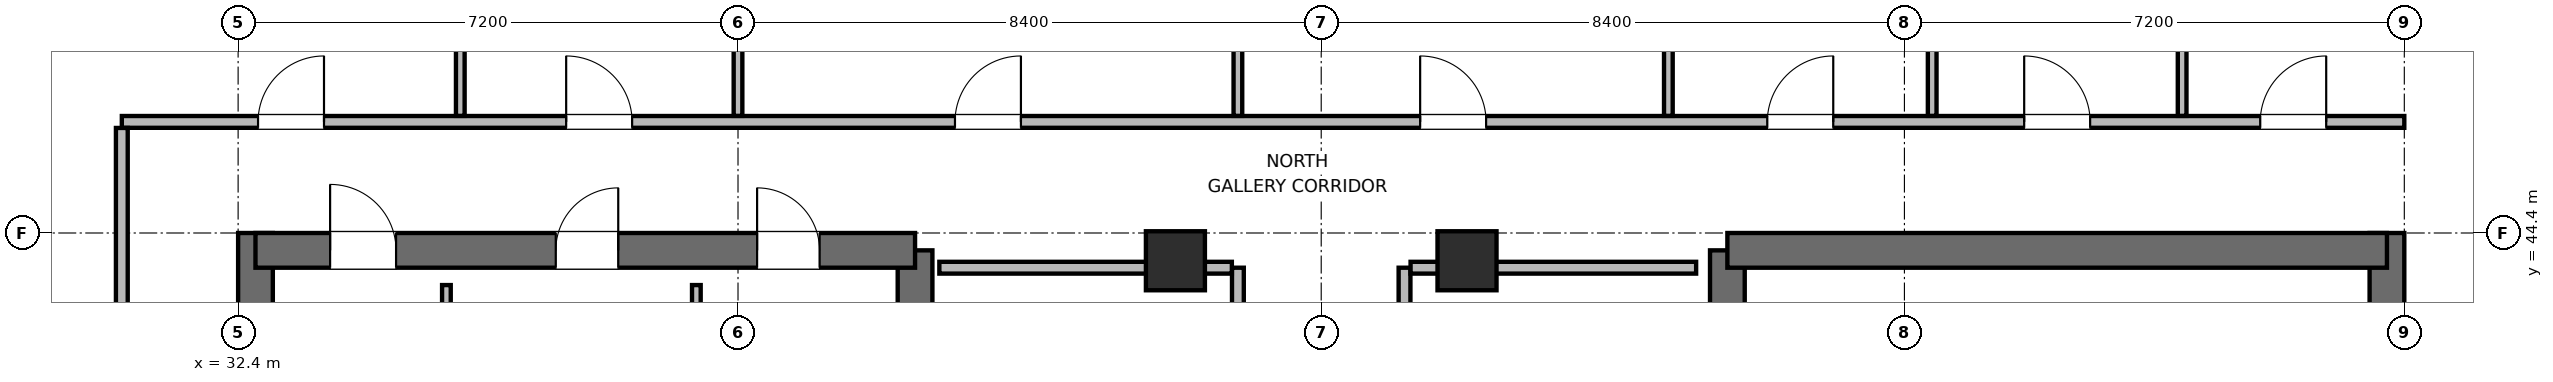
"""IFC4 building model, lengths in metres.
Left out: names, types, materials, properties, quantities, classifications, styles, units other than length and angle.
Written with IfcOpenShell. Run it as: python <this file> out.ifc"""

import sys

from ifc_helpers import new_model, si_unit, direction, frame, frame_2d, origin, origin_2d, place, context, subcontext, project, spatial, rectangle, extrude, element, fill, save


model = new_model("IFC4")
c1 = context("Model", 3, precision=1e-05, world=origin(), true_north=direction((0.0, 1.0)))
c2 = subcontext(c1, "Body", "Model", "MODEL_VIEW")
j1 = project(units=[si_unit("LENGTHUNIT", "METRE"), si_unit("PLANEANGLEUNIT", "RADIAN")], contexts=[c1])
p1 = place(None, origin())
s1 = spatial("IfcSite", under=j1, at=p1, CompositionType="ELEMENT")
p2 = place(p1, origin())
s2 = spatial("IfcBuilding", under=s1, at=p2, CompositionType="ELEMENT")
p3 = place(p2, frame((0.0, 0.0, 302.4)))
s3 = spatial("IfcBuildingStorey", under=s2, at=p3, CompositionType="ELEMENT", Elevation=302.4)
p4 = place(p3, frame((32.65, 27.6, 0.0), z_axis=(0.0, 0.0, 1.0), x_axis=(0.0, 1.0, 0.0)))
e1 = element("IfcWall", 1, at=p4, inside=s3, PredefinedType="SHEAR", context=c2, shape_type="SweptSolid", body=[
    extrude(rectangle(XDim=16.8, YDim=0.5, at=frame_2d((8.4, 0.0))), origin(), (0.0, 0.0, 1.0), 3.9),
])
p5 = place(p3, frame((42.15, 37.8, 0.0), z_axis=(0.0, 0.0, 1.0), x_axis=(0.0, 1.0, 0.0)))
e2 = element("IfcWall", 2, at=p5, inside=s3, PredefinedType="SHEAR", context=c2, shape_type="SweptSolid", body=[
    extrude(rectangle(XDim=6.35, YDim=0.5, at=frame_2d((3.175, 0.0))), origin(), (0.0, 0.0, 1.0), 3.9),
])
p6 = place(p3, frame((32.65, 44.15, 0.0), z_axis=(0.0, 0.0, 1.0), x_axis=(1.0, 0.0, 0.0)))
e3 = element("IfcWall", 3, at=p6, inside=s3, PredefinedType="SHEAR", context=c2, shape_type="SweptSolid", body=[
    extrude(rectangle(XDim=9.5, YDim=0.5, at=frame_2d((4.75, 0.0))), origin(), (0.0, 0.0, 1.0), 3.9),
])
p7 = place(p6, frame((1.075, 0.0, 0.0)))
e4 = element("IfcOpeningElement", 4, at=p7, cuts=e3, PredefinedType="OPENING", context=c2, shape_type="SweptSolid", body=[
    extrude(rectangle(XDim=0.95, YDim=2.04, at=frame_2d((0.475, 1.02))), frame((0.0, 0.26, 0.0), z_axis=(0.0, -1.0, 0.0), x_axis=(1.0, 0.0, 0.0)), (0.0, 0.0, 1.0), 0.52),
])
p8 = place(p6, frame((4.325, 0.0, 0.0)))
e5 = element("IfcOpeningElement", 5, at=p8, cuts=e3, PredefinedType="OPENING", context=c2, shape_type="SweptSolid", body=[
    extrude(rectangle(XDim=0.9, YDim=2.02, at=frame_2d((0.45, 1.01))), frame((0.0, 0.26, 0.0), z_axis=(0.0, -1.0, 0.0), x_axis=(1.0, 0.0, 0.0)), (0.0, 0.0, 1.0), 0.52),
])
p9 = place(p6, frame((7.225, 0.0, 0.0)))
e6 = element("IfcOpeningElement", 6, at=p9, cuts=e3, PredefinedType="OPENING", context=c2, shape_type="SweptSolid", body=[
    extrude(rectangle(XDim=0.9, YDim=2.02, at=frame_2d((0.45, 1.01))), frame((0.0, 0.26, 0.0), z_axis=(0.0, -1.0, 0.0), x_axis=(1.0, 0.0, 0.0)), (0.0, 0.0, 1.0), 0.52),
])
p10 = place(p3, frame((53.85, 38.0, 0.0), z_axis=(0.0, 0.0, 1.0), x_axis=(0.0, 1.0, 0.0)))
e7 = element("IfcWall", 7, at=p10, inside=s3, PredefinedType="SHEAR", context=c2, shape_type="SweptSolid", body=[
    extrude(rectangle(XDim=6.15, YDim=0.5, at=frame_2d((3.075, 0.0))), origin(), (0.0, 0.0, 1.0), 3.9),
])
p11 = place(p3, frame((63.35, 27.6, 0.0), z_axis=(0.0, 0.0, 1.0), x_axis=(0.0, 1.0, 0.0)))
e8 = element("IfcWall", 8, at=p11, inside=s3, PredefinedType="SHEAR", context=c2, shape_type="SweptSolid", body=[
    extrude(rectangle(XDim=16.8, YDim=0.5, at=frame_2d((8.4, 0.0))), origin(), (0.0, 0.0, 1.0), 3.9),
])
p12 = place(p3, frame((53.85, 44.15, 0.0), z_axis=(0.0, 0.0, 1.0), x_axis=(1.0, 0.0, 0.0)))
e9 = element("IfcWall", 9, at=p12, inside=s3, PredefinedType="SHEAR", context=c2, shape_type="SweptSolid", body=[
    extrude(rectangle(XDim=9.5, YDim=0.5, at=frame_2d((4.75, 0.0))), origin(), (0.0, 0.0, 1.0), 3.9),
])
for number, where, z_axis, x_axis in (
    (10, (45.9, 44.0, 0.0), (0.0, 0.0, 1.0), (1.0, 0.0, 0.0)),
    (11, (50.1, 44.0, 0.0), (0.0, 0.0, 1.0), (1.0, 0.0, 0.0)),
):
    element("IfcColumn", number, at=place(p3, frame(where, z_axis=z_axis, x_axis=x_axis)), inside=s3, PredefinedType="COLUMN", context=c2, shape_type="SweptSolid", body=[
        extrude(rectangle(XDim=0.85, YDim=0.85, at=origin_2d()), origin(), (0.0, 0.0, 1.0), 3.9),
    ])
for number, where, z_axis, x_axis in (
    (12, (35.4, 41.095, 0.0), (0.0, 0.0, 1.0), (0.0, 1.0, 0.0)),
    (13, (39.0, 41.095, 0.0), (0.0, 0.0, 1.0), (0.0, 1.0, 0.0)),
):
    element("IfcWall", number, at=place(p3, frame(where, z_axis=z_axis, x_axis=x_axis)), inside=s3, PredefinedType="PARTITIONING", context=c2, shape_type="SweptSolid", body=[
        extrude(rectangle(XDim=2.555, YDim=0.125, at=frame_2d((1.277, 0.0))), origin(), (0.0, 0.0, 1.0), 3.68),
    ])
p13 = place(p3, frame((46.8, 37.9, 0.0), z_axis=(0.0, 0.0, 1.0), x_axis=(0.0, 1.0, 0.0)))
e14 = element("IfcWall", 14, at=p13, inside=s3, PredefinedType="PARTITIONING", context=c2, shape_type="SweptSolid", body=[
    extrude(rectangle(XDim=6.0, YDim=0.17, at=frame_2d((3.0, 0.0))), origin(), (0.0, 0.0, 1.0), 3.68),
])
p14 = place(p13, frame((0.69, 0.0, 0.0)))
e15 = element("IfcOpeningElement", 15, at=p14, cuts=e14, PredefinedType="OPENING", context=c2, shape_type="SweptSolid", body=[
    extrude(rectangle(XDim=0.9, YDim=2.02, at=frame_2d((0.45, 1.01))), frame((0.0, 0.095, 0.0), z_axis=(0.0, -1.0, 0.0), x_axis=(1.0, 0.0, 0.0)), (0.0, 0.0, 1.0), 0.19),
])
p15 = place(p13, frame((3.69, 0.0, 0.0)))
e16 = element("IfcOpeningElement", 16, at=p15, cuts=e14, PredefinedType="OPENING", context=c2, shape_type="SweptSolid", body=[
    extrude(rectangle(XDim=0.9, YDim=2.02, at=frame_2d((0.45, 1.01))), frame((0.0, 0.095, 0.0), z_axis=(0.0, -1.0, 0.0), x_axis=(1.0, 0.0, 0.0)), (0.0, 0.0, 1.0), 0.19),
])
p16 = place(p3, frame((42.5, 43.9, 0.0), z_axis=(0.0, 0.0, 1.0), x_axis=(1.0, 0.0, 0.0)))
e17 = element("IfcWall", 17, at=p16, inside=s3, PredefinedType="PARTITIONING", context=c2, shape_type="SweptSolid", body=[
    extrude(rectangle(XDim=4.213, YDim=0.17, at=frame_2d((2.106, 0.0))), origin(), (0.0, 0.0, 1.0), 2.765),
])
p17 = place(p3, frame((49.2, 37.9, 0.0), z_axis=(0.0, 0.0, 1.0), x_axis=(0.0, 1.0, 0.0)))
e18 = element("IfcWall", 18, at=p17, inside=s3, PredefinedType="PARTITIONING", context=c2, shape_type="SweptSolid", body=[
    extrude(rectangle(XDim=6.0, YDim=0.17, at=frame_2d((3.0, 0.0))), origin(), (0.0, 0.0, 1.0), 3.68),
])
p18 = place(p17, frame((0.54, 0.0, 0.0)))
e19 = element("IfcOpeningElement", 19, at=p18, cuts=e18, PredefinedType="OPENING", context=c2, shape_type="SweptSolid", body=[
    extrude(rectangle(XDim=0.9, YDim=2.02, at=frame_2d((0.45, 1.01))), frame((0.0, 0.095, 0.0), z_axis=(0.0, -1.0, 0.0), x_axis=(1.0, 0.0, 0.0)), (0.0, 0.0, 1.0), 0.19),
])
p19 = place(p17, frame((2.55, 0.0, 0.0)))
e20 = element("IfcOpeningElement", 20, at=p19, cuts=e18, PredefinedType="OPENING", context=c2, shape_type="SweptSolid", body=[
    extrude(rectangle(XDim=0.9, YDim=2.02, at=frame_2d((0.45, 1.01))), frame((0.0, 0.095, 0.0), z_axis=(0.0, -1.0, 0.0), x_axis=(1.0, 0.0, 0.0)), (0.0, 0.0, 1.0), 0.19),
])
p20 = place(p17, frame((4.56, 0.0, 0.0)))
e21 = element("IfcOpeningElement", 21, at=p20, cuts=e18, PredefinedType="OPENING", context=c2, shape_type="SweptSolid", body=[
    extrude(rectangle(XDim=0.9, YDim=2.02, at=frame_2d((0.45, 1.01))), frame((0.0, 0.095, 0.0), z_axis=(0.0, -1.0, 0.0), x_axis=(1.0, 0.0, 0.0)), (0.0, 0.0, 1.0), 0.19),
])
p21 = place(p3, frame((49.287, 43.9, 0.0), z_axis=(0.0, 0.0, 1.0), x_axis=(1.0, 0.0, 0.0)))
e22 = element("IfcWall", 22, at=p21, inside=s3, PredefinedType="PARTITIONING", context=c2, shape_type="SweptSolid", body=[
    extrude(rectangle(XDim=4.113, YDim=0.17, at=frame_2d((2.056, 0.0))), origin(), (0.0, 0.0, 1.0), 2.765),
])
p22 = place(p3, frame((30.725, 46.0, 0.0), z_axis=(0.0, 0.0, 1.0), x_axis=(1.0, 0.0, 0.0)))
e23 = element("IfcWall", 23, at=p22, inside=s3, PredefinedType="PARTITIONING", context=c2, shape_type="SweptSolid", body=[
    extrude(rectangle(XDim=32.875, YDim=0.17, at=frame_2d((16.438, 0.0))), origin(), (0.0, 0.0, 1.0), 3.68),
])
p23 = place(p22, frame((1.962, 0.0, 0.0)))
e24 = element("IfcOpeningElement", 24, at=p23, cuts=e23, PredefinedType="OPENING", context=c2, shape_type="SweptSolid", body=[
    extrude(rectangle(XDim=0.95, YDim=2.04, at=frame_2d((0.475, 1.02))), frame((0.0, 0.095, 0.0), z_axis=(0.0, -1.0, 0.0), x_axis=(1.0, 0.0, 0.0)), (0.0, 0.0, 1.0), 0.19),
])
p24 = place(p22, frame((6.4, 0.0, 0.0)))
e25 = element("IfcOpeningElement", 25, at=p24, cuts=e23, PredefinedType="OPENING", context=c2, shape_type="SweptSolid", body=[
    extrude(rectangle(XDim=0.95, YDim=2.04, at=frame_2d((0.475, 1.02))), frame((0.0, 0.095, 0.0), z_axis=(0.0, -1.0, 0.0), x_axis=(1.0, 0.0, 0.0)), (0.0, 0.0, 1.0), 0.19),
])
p25 = place(p22, frame((12.0, 0.0, 0.0)))
e26 = element("IfcOpeningElement", 26, at=p25, cuts=e23, PredefinedType="OPENING", context=c2, shape_type="SweptSolid", body=[
    extrude(rectangle(XDim=0.95, YDim=2.04, at=frame_2d((0.475, 1.02))), frame((0.0, 0.095, 0.0), z_axis=(0.0, -1.0, 0.0), x_axis=(1.0, 0.0, 0.0)), (0.0, 0.0, 1.0), 0.19),
])
p26 = place(p22, frame((18.7, 0.0, 0.0)))
e27 = element("IfcOpeningElement", 27, at=p26, cuts=e23, PredefinedType="OPENING", context=c2, shape_type="SweptSolid", body=[
    extrude(rectangle(XDim=0.95, YDim=2.04, at=frame_2d((0.475, 1.02))), frame((0.0, 0.095, 0.0), z_axis=(0.0, -1.0, 0.0), x_axis=(1.0, 0.0, 0.0)), (0.0, 0.0, 1.0), 0.19),
])
p27 = place(p22, frame((23.7, 0.0, 0.0)))
e28 = element("IfcOpeningElement", 28, at=p27, cuts=e23, PredefinedType="OPENING", context=c2, shape_type="SweptSolid", body=[
    extrude(rectangle(XDim=0.95, YDim=2.04, at=frame_2d((0.475, 1.02))), frame((0.0, 0.095, 0.0), z_axis=(0.0, -1.0, 0.0), x_axis=(1.0, 0.0, 0.0)), (0.0, 0.0, 1.0), 0.19),
])
p28 = place(p22, frame((27.4, 0.0, 0.0)))
e29 = element("IfcOpeningElement", 29, at=p28, cuts=e23, PredefinedType="OPENING", context=c2, shape_type="SweptSolid", body=[
    extrude(rectangle(XDim=0.95, YDim=2.04, at=frame_2d((0.475, 1.02))), frame((0.0, 0.095, 0.0), z_axis=(0.0, -1.0, 0.0), x_axis=(1.0, 0.0, 0.0)), (0.0, 0.0, 1.0), 0.19),
])
p29 = place(p22, frame((30.8, 0.0, 0.0)))
e30 = element("IfcOpeningElement", 30, at=p29, cuts=e23, PredefinedType="OPENING", context=c2, shape_type="SweptSolid", body=[
    extrude(rectangle(XDim=0.95, YDim=2.04, at=frame_2d((0.475, 1.02))), frame((0.0, 0.095, 0.0), z_axis=(0.0, -1.0, 0.0), x_axis=(1.0, 0.0, 0.0)), (0.0, 0.0, 1.0), 0.19),
])
p30 = place(p3, frame((30.725, 26.087, 0.0), z_axis=(0.0, 0.0, 1.0), x_axis=(0.0, 1.0, 0.0)))
e31 = element("IfcWall", 31, at=p30, inside=s3, PredefinedType="PARTITIONING", context=c2, shape_type="SweptSolid", body=[
    extrude(rectangle(XDim=19.826, YDim=0.17, at=frame_2d((9.913, 0.0))), origin(), (0.0, 0.0, 1.0), 3.68),
])
p31 = place(p30, frame((3.138, 0.0, 0.0)))
e32 = element("IfcOpeningElement", 32, at=p31, cuts=e31, PredefinedType="OPENING", context=c2, shape_type="SweptSolid", body=[
    extrude(rectangle(XDim=0.95, YDim=2.04, at=frame_2d((0.475, 1.02))), frame((0.0, 0.095, 0.0), z_axis=(0.0, -1.0, 0.0), x_axis=(1.0, 0.0, 0.0)), (0.0, 0.0, 1.0), 0.19),
])
p32 = place(p30, frame((10.038, 0.0, 0.0)))
e33 = element("IfcOpeningElement", 33, at=p32, cuts=e31, PredefinedType="OPENING", context=c2, shape_type="SweptSolid", body=[
    extrude(rectangle(XDim=0.95, YDim=2.04, at=frame_2d((0.475, 1.02))), frame((0.0, 0.095, 0.0), z_axis=(0.0, -1.0, 0.0), x_axis=(1.0, 0.0, 0.0)), (0.0, 0.0, 1.0), 0.19),
])
p33 = place(p30, frame((16.338, 0.0, 0.0)))
e34 = element("IfcOpeningElement", 34, at=p33, cuts=e31, PredefinedType="OPENING", context=c2, shape_type="SweptSolid", body=[
    extrude(rectangle(XDim=0.95, YDim=2.04, at=frame_2d((0.475, 1.02))), frame((0.0, 0.095, 0.0), z_axis=(0.0, -1.0, 0.0), x_axis=(1.0, 0.0, 0.0)), (0.0, 0.0, 1.0), 0.19),
])
p34 = place(p3, frame((35.6, 46.087, 0.0), z_axis=(0.0, 0.0, 1.0), x_axis=(0.0, 1.0, 0.0)))
e35 = element("IfcWall", 35, at=p34, inside=s3, PredefinedType="PARTITIONING", context=c2, shape_type="SweptSolid", body=[
    extrude(rectangle(XDim=7.078, YDim=0.125, at=frame_2d((3.539, 0.0))), origin(), (0.0, 0.0, 1.0), 3.68),
])
p35 = place(p3, frame((39.6, 46.087, 0.0), z_axis=(0.0, 0.0, 1.0), x_axis=(0.0, 1.0, 0.0)))
e36 = element("IfcWall", 36, at=p35, inside=s3, PredefinedType="PARTITIONING", context=c2, shape_type="SweptSolid", body=[
    extrude(rectangle(XDim=7.078, YDim=0.125, at=frame_2d((3.539, 0.0))), origin(), (0.0, 0.0, 1.0), 3.043),
])
p36 = place(p3, frame((46.8, 46.087, 0.0), z_axis=(0.0, 0.0, 1.0), x_axis=(0.0, 1.0, 0.0)))
e37 = element("IfcWall", 37, at=p36, inside=s3, PredefinedType="PARTITIONING", context=c2, shape_type="SweptSolid", body=[
    extrude(rectangle(XDim=5.838, YDim=0.125, at=frame_2d((2.919, 0.0))), origin(), (0.0, 0.0, 1.0), 3.68),
])
p37 = place(p3, frame((53.0, 46.087, 0.0), z_axis=(0.0, 0.0, 1.0), x_axis=(0.0, 1.0, 0.0)))
e38 = element("IfcWall", 38, at=p37, inside=s3, PredefinedType="PARTITIONING", context=c2, shape_type="SweptSolid", body=[
    extrude(rectangle(XDim=3.758, YDim=0.125, at=frame_2d((1.879, 0.0))), origin(), (0.0, 0.0, 1.0), 3.043),
])
for number, where, z_axis, x_axis in (
    (39, (56.8, 46.087, 0.0), (0.0, 0.0, 1.0), (0.0, 1.0, 0.0)),
    (40, (60.4, 46.087, 0.0), (0.0, 0.0, 1.0), (0.0, 1.0, 0.0)),
):
    element("IfcWall", number, at=place(p3, frame(where, z_axis=z_axis, x_axis=x_axis)), inside=s3, PredefinedType="PARTITIONING", context=c2, shape_type="SweptSolid", body=[
        extrude(rectangle(XDim=7.038, YDim=0.125, at=frame_2d((3.519, 0.0))), origin(), (0.0, 0.0, 1.0), 3.68),
    ])
p38 = place(p7, origin())
e41 = element("IfcDoor", 41, at=p38, inside=s3, OperationType="SINGLE_SWING_LEFT", PredefinedType="DOOR", context=c2, shape_type="SweptSolid", body=[
    extrude(rectangle(XDim=0.95, YDim=2.04, at=frame_2d((0.475, 1.02))), frame((0.0, 0.025, 0.0), z_axis=(0.0, -1.0, 0.0), x_axis=(1.0, 0.0, 0.0)), (0.0, 0.0, 1.0), 0.05),
])
fill(e4, e41)
p39 = place(p8, origin())
e42 = element("IfcDoor", 42, at=p39, inside=s3, OperationType="SINGLE_SWING_RIGHT", PredefinedType="DOOR", context=c2, shape_type="SweptSolid", body=[
    extrude(rectangle(XDim=0.9, YDim=2.02, at=frame_2d((0.45, 1.01))), frame((0.0, 0.025, 0.0), z_axis=(0.0, -1.0, 0.0), x_axis=(1.0, 0.0, 0.0)), (0.0, 0.0, 1.0), 0.05),
])
fill(e5, e42)
p40 = place(p9, origin())
e43 = element("IfcDoor", 43, at=p40, inside=s3, OperationType="SINGLE_SWING_LEFT", PredefinedType="DOOR", context=c2, shape_type="SweptSolid", body=[
    extrude(rectangle(XDim=0.9, YDim=2.02, at=frame_2d((0.45, 1.01))), frame((0.0, 0.025, 0.0), z_axis=(0.0, -1.0, 0.0), x_axis=(1.0, 0.0, 0.0)), (0.0, 0.0, 1.0), 0.05),
])
fill(e6, e43)
p41 = place(p23, origin())
e44 = element("IfcDoor", 44, at=p41, inside=s3, OperationType="SINGLE_SWING_RIGHT", PredefinedType="DOOR", context=c2, shape_type="SweptSolid", body=[
    extrude(rectangle(XDim=0.95, YDim=2.04, at=frame_2d((0.475, 1.02))), frame((0.0, 0.025, 0.0), z_axis=(0.0, -1.0, 0.0), x_axis=(1.0, 0.0, 0.0)), (0.0, 0.0, 1.0), 0.05),
])
fill(e24, e44)
p42 = place(p24, origin())
e45 = element("IfcDoor", 45, at=p42, inside=s3, OperationType="SINGLE_SWING_LEFT", PredefinedType="DOOR", context=c2, shape_type="SweptSolid", body=[
    extrude(rectangle(XDim=0.95, YDim=2.04, at=frame_2d((0.475, 1.02))), frame((0.0, 0.025, 0.0), z_axis=(0.0, -1.0, 0.0), x_axis=(1.0, 0.0, 0.0)), (0.0, 0.0, 1.0), 0.05),
])
fill(e25, e45)
p43 = place(p25, origin())
e46 = element("IfcDoor", 46, at=p43, inside=s3, OperationType="SINGLE_SWING_RIGHT", PredefinedType="DOOR", context=c2, shape_type="SweptSolid", body=[
    extrude(rectangle(XDim=0.95, YDim=2.04, at=frame_2d((0.475, 1.02))), frame((0.0, 0.025, 0.0), z_axis=(0.0, -1.0, 0.0), x_axis=(1.0, 0.0, 0.0)), (0.0, 0.0, 1.0), 0.05),
])
fill(e26, e46)
p44 = place(p26, origin())
e47 = element("IfcDoor", 47, at=p44, inside=s3, OperationType="SINGLE_SWING_LEFT", PredefinedType="DOOR", context=c2, shape_type="SweptSolid", body=[
    extrude(rectangle(XDim=0.95, YDim=2.04, at=frame_2d((0.475, 1.02))), frame((0.0, 0.025, 0.0), z_axis=(0.0, -1.0, 0.0), x_axis=(1.0, 0.0, 0.0)), (0.0, 0.0, 1.0), 0.05),
])
fill(e27, e47)
p45 = place(p27, origin())
e48 = element("IfcDoor", 48, at=p45, inside=s3, OperationType="SINGLE_SWING_RIGHT", PredefinedType="DOOR", context=c2, shape_type="SweptSolid", body=[
    extrude(rectangle(XDim=0.95, YDim=2.04, at=frame_2d((0.475, 1.02))), frame((0.0, 0.025, 0.0), z_axis=(0.0, -1.0, 0.0), x_axis=(1.0, 0.0, 0.0)), (0.0, 0.0, 1.0), 0.05),
])
fill(e28, e48)
p46 = place(p28, origin())
e49 = element("IfcDoor", 49, at=p46, inside=s3, OperationType="SINGLE_SWING_LEFT", PredefinedType="DOOR", context=c2, shape_type="SweptSolid", body=[
    extrude(rectangle(XDim=0.95, YDim=2.04, at=frame_2d((0.475, 1.02))), frame((0.0, 0.025, 0.0), z_axis=(0.0, -1.0, 0.0), x_axis=(1.0, 0.0, 0.0)), (0.0, 0.0, 1.0), 0.05),
])
fill(e29, e49)
p47 = place(p29, origin())
e50 = element("IfcDoor", 50, at=p47, inside=s3, OperationType="SINGLE_SWING_RIGHT", PredefinedType="DOOR", context=c2, shape_type="SweptSolid", body=[
    extrude(rectangle(XDim=0.95, YDim=2.04, at=frame_2d((0.475, 1.02))), frame((0.0, 0.025, 0.0), z_axis=(0.0, -1.0, 0.0), x_axis=(1.0, 0.0, 0.0)), (0.0, 0.0, 1.0), 0.05),
])
fill(e30, e50)
save(model, sys.argv[1])
